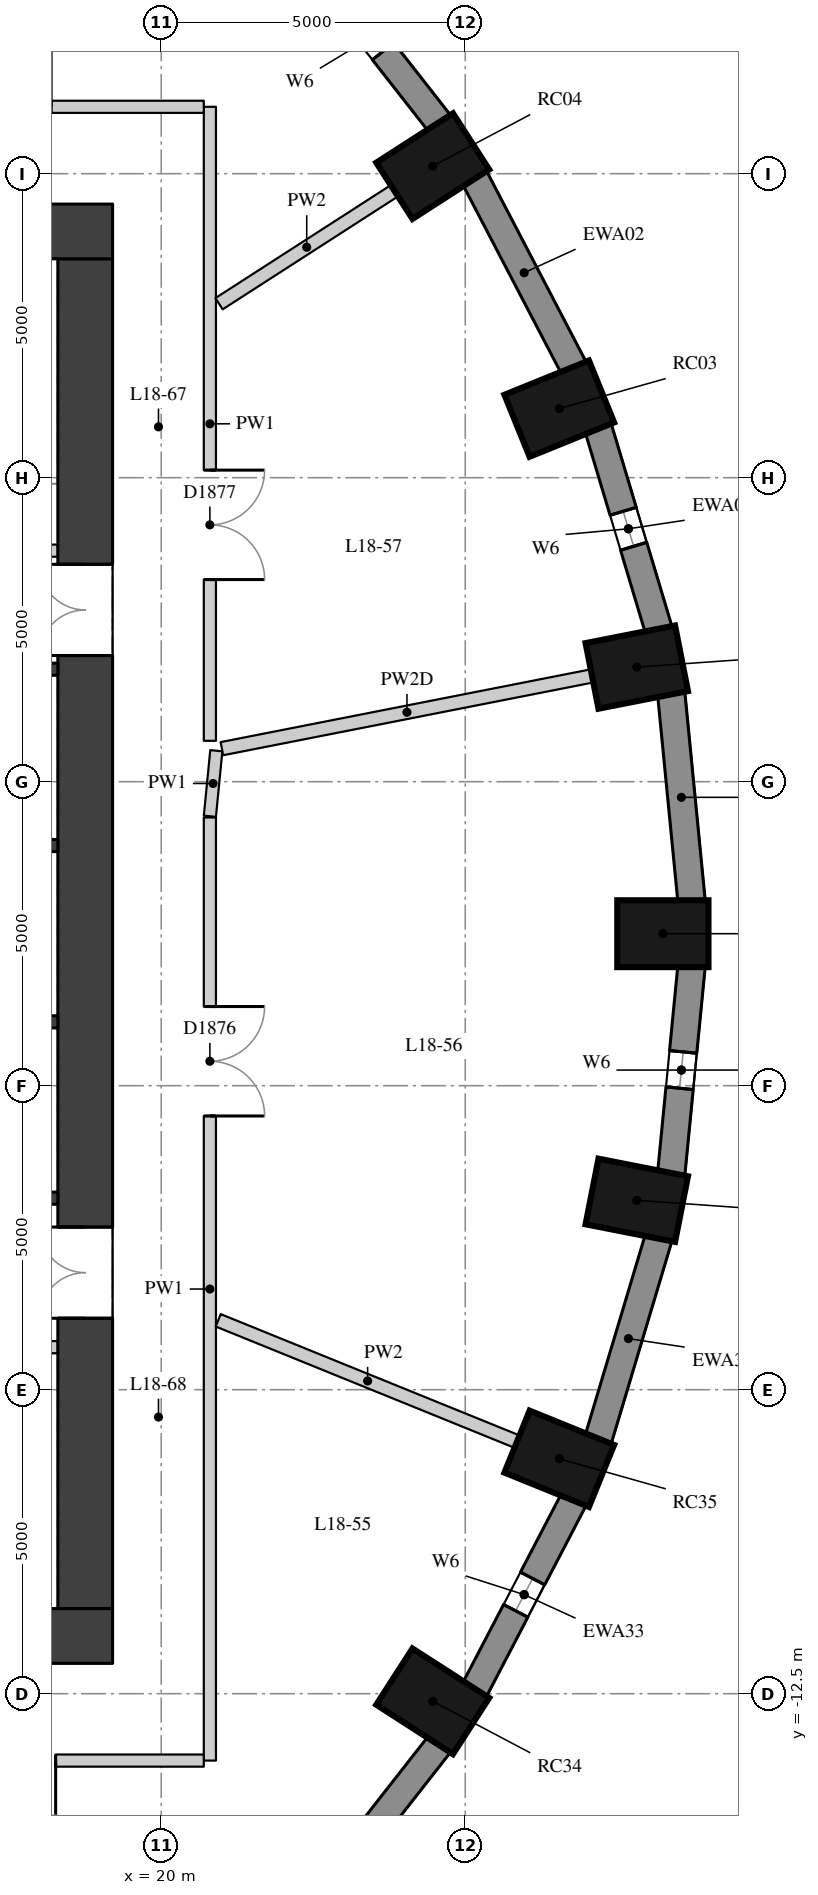
"""IFC4 building model, lengths in metres.
Left out: names, types, materials, properties, quantities, classifications, styles, units other than length and angle.
Written with IfcOpenShell. Run it as: python <this file> out.ifc"""

import sys

from ifc_helpers import new_model, si_unit, direction, frame, frame_2d, origin, origin_2d, place, context, subcontext, project, spatial, rectangle, extrude, element, fill, save


model = new_model("IFC4")
c1 = context("Model", 3, precision=1e-05, world=origin(), true_north=direction((0.0, 1.0)))
c2 = subcontext(c1, "Body", "Model", "MODEL_VIEW")
j1 = project(units=[si_unit("LENGTHUNIT", "METRE"), si_unit("PLANEANGLEUNIT", "RADIAN")], contexts=[c1])
p1 = place(None, origin())
s1 = spatial("IfcSite", under=j1, at=p1, CompositionType="ELEMENT")
p2 = place(p1, origin())
s2 = spatial("IfcBuilding", under=s1, at=p2, CompositionType="ELEMENT")
p3 = place(p2, frame((0.0, 0.0, 67.9)))
s3 = spatial("IfcBuildingStorey", under=s2, at=p3, CompositionType="ELEMENT", Elevation=67.9)
for number, where, z_axis, x_axis in (
    (1, (28.25, 0.0, 0.0), (0.0, 0.0, 1.0), (1.0, 0.0, 0.0)),
    (2, (27.821, 4.385, 0.0), (0.0, 0.0, 1.0), (0.981, 0.193, 0.0)),
    (3, (26.546, 8.636, 0.0), (0.0, 0.0, 1.0), (0.927, 0.376, 0.0)),
    (4, (24.465, 12.625, 0.0), (0.0, 0.0, 1.0), (0.841, 0.541, 0.0)),
    (5, (24.465, -12.625, 0.0), (0.0, 0.0, 1.0), (0.841, -0.541, 0.0)),
    (6, (26.546, -8.636, 0.0), (0.0, 0.0, 1.0), (0.927, -0.376, 0.0)),
    (7, (27.821, -4.385, 0.0), (0.0, 0.0, 1.0), (0.981, -0.193, 0.0)),
):
    element("IfcColumn", number, at=place(p3, frame(where, z_axis=z_axis, x_axis=x_axis)), inside=s3, PredefinedType="COLUMN", context=c2, shape_type="SweptSolid", body=[
        extrude(rectangle(XDim=1.5, YDim=1.1, at=origin_2d()), origin(), (0.0, 0.0, 1.0), 3.3),
    ])
p4 = place(p3, frame((28.722, 0.53, 0.0), z_axis=(0.0, 0.0, 1.0), x_axis=(-0.097389581596, 0.995246336038, 0.0)))
e8 = element("IfcWall", 8, at=p4, inside=s3, PredefinedType="SOLIDWALL", context=c2, shape_type="SweptSolid", body=[
    extrude(rectangle(XDim=3.442, YDim=0.45, at=frame_2d((1.721, 0.0))), origin(), (0.0, 0.0, 1.0), 3.02),
])
p5 = place(p3, frame((28.182, 4.996, 0.0), z_axis=(0.0, 0.0, 1.0), x_axis=(-0.287064133733, 0.957911364963, 0.0)))
e9 = element("IfcWall", 9, at=p5, inside=s3, PredefinedType="SOLIDWALL", context=c2, shape_type="SweptSolid", body=[
    extrude(rectangle(XDim=3.473, YDim=0.45, at=frame_2d((1.737, 0.0))), origin(), (0.0, 0.0, 1.0), 3.02),
])
p6 = place(p5, frame((1.437, 0.0, 0.4)))
e10 = element("IfcOpeningElement", 10, at=p6, cuts=e9, PredefinedType="OPENING", context=c2, shape_type="SweptSolid", body=[
    extrude(rectangle(XDim=0.6, YDim=1.75, at=frame_2d((0.3, 0.875))), frame((0.0, 0.235, 0.0), z_axis=(0.0, -1.0, 0.0), x_axis=(1.0, 0.0, 0.0)), (0.0, 0.0, 1.0), 0.47),
])
p7 = place(p3, frame((26.786, 9.305, 0.0), z_axis=(0.0, 0.0, 1.0), x_axis=(-0.462492775226, 0.886623050041, 0.0)))
e11 = element("IfcWall", 11, at=p7, inside=s3, PredefinedType="SOLIDWALL", context=c2, shape_type="SweptSolid", body=[
    extrude(rectangle(XDim=3.532, YDim=0.45, at=frame_2d((1.766, 0.0))), origin(), (0.0, 0.0, 1.0), 3.02),
])
p8 = place(p3, frame((24.578, 13.328, 0.0), z_axis=(0.0, 0.0, 1.0), x_axis=(-0.616661975264, 0.787228053529, 0.0)))
e12 = element("IfcWall", 12, at=p8, inside=s3, PredefinedType="SOLIDWALL", context=c2, shape_type="SweptSolid", body=[
    extrude(rectangle(XDim=3.61, YDim=0.45, at=frame_2d((1.805, 0.0))), origin(), (0.0, 0.0, 1.0), 3.02),
])
p9 = place(p8, frame((1.505, 0.0, 0.4)))
e13 = element("IfcOpeningElement", 13, at=p9, cuts=e12, PredefinedType="OPENING", context=c2, shape_type="SweptSolid", body=[
    extrude(rectangle(XDim=0.6, YDim=1.75, at=frame_2d((0.3, 0.875))), frame((0.0, 0.235, 0.0), z_axis=(0.0, -1.0, 0.0), x_axis=(1.0, 0.0, 0.0)), (0.0, 0.0, 1.0), 0.47),
])
p10 = place(p3, frame((22.352, -16.17, 0.0), z_axis=(0.0, 0.0, 1.0), x_axis=(0.616661975264, 0.787228053529, 0.0)))
e14 = element("IfcWall", 14, at=p10, inside=s3, PredefinedType="SOLIDWALL", context=c2, shape_type="SweptSolid", body=[
    extrude(rectangle(XDim=3.61, YDim=0.45, at=frame_2d((1.805, 0.0))), origin(), (0.0, 0.0, 1.0), 3.02),
])
p11 = place(p3, frame((25.152, -12.437, 0.0), z_axis=(0.0, 0.0, 1.0), x_axis=(0.462492775226, 0.886623050041, 0.0)))
e15 = element("IfcWall", 15, at=p11, inside=s3, PredefinedType="SOLIDWALL", context=c2, shape_type="SweptSolid", body=[
    extrude(rectangle(XDim=3.532, YDim=0.45, at=frame_2d((1.766, 0.0))), origin(), (0.0, 0.0, 1.0), 3.02),
])
p12 = place(p11, frame((1.466, 0.0, 0.4)))
e16 = element("IfcOpeningElement", 16, at=p12, cuts=e15, PredefinedType="OPENING", context=c2, shape_type="SweptSolid", body=[
    extrude(rectangle(XDim=0.6, YDim=1.75, at=frame_2d((0.3, 0.875))), frame((0.0, 0.235, 0.0), z_axis=(0.0, -1.0, 0.0), x_axis=(1.0, 0.0, 0.0)), (0.0, 0.0, 1.0), 0.47),
])
p13 = place(p3, frame((27.185, -8.323, 0.0), z_axis=(0.0, 0.0, 1.0), x_axis=(0.287064133733, 0.957911364963, 0.0)))
e17 = element("IfcWall", 17, at=p13, inside=s3, PredefinedType="SOLIDWALL", context=c2, shape_type="SweptSolid", body=[
    extrude(rectangle(XDim=3.473, YDim=0.45, at=frame_2d((1.737, 0.0))), origin(), (0.0, 0.0, 1.0), 3.02),
])
p14 = place(p3, frame((28.387, -3.956, 0.0), z_axis=(0.0, 0.0, 1.0), x_axis=(0.097389581596, 0.995246336038, 0.0)))
e18 = element("IfcWall", 18, at=p14, inside=s3, PredefinedType="SOLIDWALL", context=c2, shape_type="SweptSolid", body=[
    extrude(rectangle(XDim=3.442, YDim=0.45, at=frame_2d((1.721, 0.0))), origin(), (0.0, 0.0, 1.0), 3.02),
])
p15 = place(p14, frame((1.421, 0.0, 0.4)))
e19 = element("IfcOpeningElement", 19, at=p15, cuts=e18, PredefinedType="OPENING", context=c2, shape_type="SweptSolid", body=[
    extrude(rectangle(XDim=0.6, YDim=1.75, at=frame_2d((0.3, 0.875))), frame((0.0, 0.235, 0.0), z_axis=(0.0, -1.0, 0.0), x_axis=(1.0, 0.0, 0.0)), (0.0, 0.0, 1.0), 0.47),
])
p16 = place(p3, frame((18.75, -11.1, 0.0), z_axis=(0.0, 0.0, 1.0), x_axis=(0.0, 1.0, 0.0)))
e20 = element("IfcWall", 20, at=p16, inside=s3, PredefinedType="SHEAR", context=c2, shape_type="SweptSolid", body=[
    extrude(rectangle(XDim=22.2, YDim=0.9, at=frame_2d((11.1, 0.0))), origin(), (0.0, 0.0, 1.0), 3.02),
])
p17 = place(p16, frame((15.675, 0.0, 0.0)))
e21 = element("IfcOpeningElement", 21, at=p17, cuts=e20, PredefinedType="OPENING", context=c2, shape_type="SweptSolid", body=[
    extrude(rectangle(XDim=1.5, YDim=2.1, at=frame_2d((0.75, 1.05))), frame((0.0, 0.46, 0.0), z_axis=(0.0, -1.0, 0.0), x_axis=(1.0, 0.0, 0.0)), (0.0, 0.0, 1.0), 0.92),
])
p18 = place(p16, frame((4.775, 0.0, 0.0)))
e22 = element("IfcOpeningElement", 22, at=p18, cuts=e20, PredefinedType="OPENING", context=c2, shape_type="SweptSolid", body=[
    extrude(rectangle(XDim=1.5, YDim=2.1, at=frame_2d((0.75, 1.05))), frame((0.0, 0.46, 0.0), z_axis=(0.0, -1.0, 0.0), x_axis=(1.0, 0.0, 0.0)), (0.0, 0.0, 1.0), 0.92),
])
for number, where, z_axis, x_axis in (
    (23, (4.0, 11.55, 0.0), (0.0, 0.0, 1.0), (1.0, 0.0, 0.0)),
    (24, (4.0, -11.55, 0.0), (0.0, 0.0, 1.0), (1.0, 0.0, 0.0)),
):
    element("IfcWall", number, at=place(p3, frame(where, z_axis=z_axis, x_axis=x_axis)), inside=s3, PredefinedType="SHEAR", context=c2, shape_type="SweptSolid", body=[
        extrude(rectangle(XDim=15.2, YDim=0.9, at=frame_2d((7.6, 0.0))), origin(), (0.0, 0.0, 1.0), 3.02),
    ])
for number, where, z_axis, x_axis in (
    (25, (16.0, -4.35, 0.0), (0.0, 0.0, 1.0), (1.0, 0.0, 0.0)),
    (26, (16.0, -1.45, 0.0), (0.0, 0.0, 1.0), (1.0, 0.0, 0.0)),
    (27, (16.0, 1.45, 0.0), (0.0, 0.0, 1.0), (1.0, 0.0, 0.0)),
    (28, (16.0, 4.35, 0.0), (0.0, 0.0, 1.0), (1.0, 0.0, 0.0)),
):
    element("IfcWall", number, at=place(p3, frame(where, z_axis=z_axis, x_axis=x_axis)), inside=s3, PredefinedType="SHEAR", context=c2, shape_type="SweptSolid", body=[
        extrude(rectangle(XDim=2.3, YDim=0.2, at=frame_2d((1.15, 0.0))), origin(), (0.0, 0.0, 1.0), 3.02),
    ])
p19 = place(p3, frame((16.0, 6.3, 0.0), z_axis=(0.0, 0.0, 1.0), x_axis=(1.0, 0.0, 0.0)))
e29 = element("IfcWall", 29, at=p19, inside=s3, PredefinedType="PARTITIONING", context=c2, shape_type="SweptSolid", body=[
    extrude(rectangle(XDim=2.3, YDim=0.2, at=frame_2d((1.15, 0.0))), origin(), (0.0, 0.0, 1.0), 3.02),
])
p20 = place(p19, frame((0.3, 0.0, 0.0)))
e30 = element("IfcOpeningElement", 30, at=p20, cuts=e29, PredefinedType="OPENING", context=c2, shape_type="SweptSolid", body=[
    extrude(rectangle(XDim=0.9, YDim=2.1, at=frame_2d((0.45, 1.05))), frame((0.0, 0.11, 0.0), z_axis=(0.0, -1.0, 0.0), x_axis=(1.0, 0.0, 0.0)), (0.0, 0.0, 1.0), 0.22),
])
p21 = place(p3, frame((16.0, -6.8, 0.0), z_axis=(0.0, 0.0, 1.0), x_axis=(1.0, 0.0, 0.0)))
e31 = element("IfcWall", 31, at=p21, inside=s3, PredefinedType="PARTITIONING", context=c2, shape_type="SweptSolid", body=[
    extrude(rectangle(XDim=2.3, YDim=0.2, at=frame_2d((1.15, 0.0))), origin(), (0.0, 0.0, 1.0), 3.02),
])
p22 = place(p21, frame((0.2, 0.0, 0.0)))
e32 = element("IfcOpeningElement", 32, at=p22, cuts=e31, PredefinedType="OPENING", context=c2, shape_type="SweptSolid", body=[
    extrude(rectangle(XDim=0.9, YDim=2.1, at=frame_2d((0.45, 1.05))), frame((0.0, 0.11, 0.0), z_axis=(0.0, -1.0, 0.0), x_axis=(1.0, 0.0, 0.0)), (0.0, 0.0, 1.0), 0.22),
])
p23 = place(p3, frame((20.8, 13.6, 0.0), z_axis=(0.0, 0.0, 1.0), x_axis=(0.0, -1.0, 0.0)))
e33 = element("IfcWall", 33, at=p23, inside=s3, PredefinedType="PARTITIONING", context=c2, shape_type="SweptSolid", body=[
    extrude(rectangle(XDim=10.428, YDim=0.2, at=frame_2d((5.214, 0.0))), origin(), (0.0, 0.0, 1.0), 3.02),
])
p24 = place(p23, frame((5.976, 0.0, 0.0)))
e34 = element("IfcOpeningElement", 34, at=p24, cuts=e33, PredefinedType="OPENING", context=c2, shape_type="SweptSolid", body=[
    extrude(rectangle(XDim=1.8, YDim=2.1, at=frame_2d((0.9, 1.05))), frame((0.0, 0.11, 0.0), z_axis=(0.0, -1.0, 0.0), x_axis=(1.0, 0.0, 0.0)), (0.0, 0.0, 1.0), 0.22),
])
p25 = place(p3, frame((20.906, 3.01, 0.0), z_axis=(0.0, 0.0, 1.0), x_axis=(-0.09782971129, -0.995203169001, 0.0)))
e35 = element("IfcWall", 35, at=p25, inside=s3, PredefinedType="PARTITIONING", context=c2, shape_type="SweptSolid", body=[
    extrude(rectangle(XDim=1.083, YDim=0.2, at=frame_2d((0.542, 0.0))), origin(), (0.0, 0.0, 1.0), 3.02),
])
p26 = place(p3, frame((20.8, 1.912, 0.0), z_axis=(0.0, 0.0, 1.0), x_axis=(0.0, -1.0, 0.0)))
e36 = element("IfcWall", 36, at=p26, inside=s3, PredefinedType="PARTITIONING", context=c2, shape_type="SweptSolid", body=[
    extrude(rectangle(XDim=15.512, YDim=0.2, at=frame_2d((7.756, 0.0))), origin(), (0.0, 0.0, 1.0), 3.02),
])
p27 = place(p26, frame((3.11, 0.0, 0.0)))
e37 = element("IfcOpeningElement", 37, at=p27, cuts=e36, PredefinedType="OPENING", context=c2, shape_type="SweptSolid", body=[
    extrude(rectangle(XDim=1.8, YDim=2.1, at=frame_2d((0.9, 1.05))), frame((0.0, 0.11, 0.0), z_axis=(0.0, -1.0, 0.0), x_axis=(1.0, 0.0, 0.0)), (0.0, 0.0, 1.0), 0.22),
])
p28 = place(p3, frame((20.7, -13.6, 0.0), z_axis=(0.0, 0.0, 1.0), x_axis=(-1.0, 0.0, 0.0)))
e38 = element("IfcWall", 38, at=p28, inside=s3, PredefinedType="PARTITIONING", context=c2, shape_type="SweptSolid", body=[
    extrude(rectangle(XDim=9.331, YDim=0.2, at=frame_2d((4.666, 0.0))), origin(), (0.0, 0.0, 1.0), 3.02),
])
p29 = place(p28, frame((2.436, 0.0, 0.0)))
e39 = element("IfcOpeningElement", 39, at=p29, cuts=e38, PredefinedType="OPENING", context=c2, shape_type="SweptSolid", body=[
    extrude(rectangle(XDim=1.8, YDim=2.1, at=frame_2d((0.9, 1.05))), frame((0.0, 0.11, 0.0), z_axis=(0.0, -1.0, 0.0), x_axis=(1.0, 0.0, 0.0)), (0.0, 0.0, 1.0), 0.22),
])
p30 = place(p3, frame((14.086, 13.6, 0.0), z_axis=(0.0, 0.0, 1.0), x_axis=(1.0, 0.0, 0.0)))
e40 = element("IfcWall", 40, at=p30, inside=s3, PredefinedType="PARTITIONING", context=c2, shape_type="SweptSolid", body=[
    extrude(rectangle(XDim=6.614, YDim=0.2, at=frame_2d((3.307, 0.0))), origin(), (0.0, 0.0, 1.0), 3.02),
])
p31 = place(p30, frame((2.303, 0.0, 0.0)))
e41 = element("IfcOpeningElement", 41, at=p31, cuts=e40, PredefinedType="OPENING", context=c2, shape_type="SweptSolid", body=[
    extrude(rectangle(XDim=1.8, YDim=2.1, at=frame_2d((0.9, 1.05))), frame((0.0, 0.11, 0.0), z_axis=(0.0, -1.0, 0.0), x_axis=(1.0, 0.0, 0.0)), (0.0, 0.0, 1.0), 0.22),
])
p32 = place(p3, frame((27.085, 4.24, 0.0), z_axis=(0.0, 0.0, 1.0), x_axis=(-0.981208260902, -0.192951674616, 0.0)))
e42 = element("IfcWall", 42, at=p32, inside=s3, PredefinedType="PARTITIONING", context=c2, shape_type="SweptSolid", body=[
    extrude(rectangle(XDim=6.204, YDim=0.22, at=frame_2d((3.102, 0.0))), origin(), (0.0, 0.0, 1.0), 2.47),
])
p33 = place(p3, frame((23.835, 12.219, 0.0), z_axis=(0.0, 0.0, 1.0), x_axis=(-0.840694872373, -0.541509124176, 0.0)))
e43 = element("IfcWall", 43, at=p33, inside=s3, PredefinedType="PARTITIONING", context=c2, shape_type="SweptSolid", body=[
    extrude(rectangle(XDim=3.43, YDim=0.22, at=frame_2d((1.715, 0.0))), origin(), (0.0, 0.0, 1.0), 3.02),
])
p34 = place(p3, frame((25.851, -8.354, 0.0), z_axis=(0.0, 0.0, 1.0), x_axis=(-0.926546814299, 0.376179479653, 0.0)))
e44 = element("IfcWall", 44, at=p34, inside=s3, PredefinedType="PARTITIONING", context=c2, shape_type="SweptSolid", body=[
    extrude(rectangle(XDim=5.304, YDim=0.22, at=frame_2d((2.652, 0.0))), origin(), (0.0, 0.0, 1.0), 3.02),
])
p35 = place(p6, origin())
e45 = element("IfcWindow", 45, at=p35, inside=s3, PartitioningType="SINGLE_PANEL", PredefinedType="WINDOW", context=c2, shape_type="SweptSolid", body=[
    extrude(rectangle(XDim=0.6, YDim=1.75, at=frame_2d((0.3, 0.875))), frame((0.0, 0.035, 0.0), z_axis=(0.0, -1.0, 0.0), x_axis=(1.0, 0.0, 0.0)), (0.0, 0.0, 1.0), 0.06),
])
fill(e10, e45)
p36 = place(p9, origin())
e46 = element("IfcWindow", 46, at=p36, inside=s3, PartitioningType="SINGLE_PANEL", PredefinedType="WINDOW", context=c2, shape_type="SweptSolid", body=[
    extrude(rectangle(XDim=0.6, YDim=1.75, at=frame_2d((0.3, 0.875))), frame((0.0, 0.035, 0.0), z_axis=(0.0, -1.0, 0.0), x_axis=(1.0, 0.0, 0.0)), (0.0, 0.0, 1.0), 0.06),
])
fill(e13, e46)
p37 = place(p12, origin())
e47 = element("IfcWindow", 47, at=p37, inside=s3, PartitioningType="SINGLE_PANEL", PredefinedType="WINDOW", context=c2, shape_type="SweptSolid", body=[
    extrude(rectangle(XDim=0.6, YDim=1.75, at=frame_2d((0.3, 0.875))), frame((0.0, 0.035, 0.0), z_axis=(0.0, -1.0, 0.0), x_axis=(1.0, 0.0, 0.0)), (0.0, 0.0, 1.0), 0.06),
])
fill(e16, e47)
p38 = place(p15, origin())
e48 = element("IfcWindow", 48, at=p38, inside=s3, PartitioningType="SINGLE_PANEL", PredefinedType="WINDOW", context=c2, shape_type="SweptSolid", body=[
    extrude(rectangle(XDim=0.6, YDim=1.75, at=frame_2d((0.3, 0.875))), frame((0.0, 0.035, 0.0), z_axis=(0.0, -1.0, 0.0), x_axis=(1.0, 0.0, 0.0)), (0.0, 0.0, 1.0), 0.06),
])
fill(e19, e48)
p39 = place(p17, origin())
e49 = element("IfcDoor", 49, at=p39, inside=s3, OperationType="DOUBLE_DOOR_SINGLE_SWING", PredefinedType="DOOR", context=c2, shape_type="SweptSolid", body=[
    extrude(rectangle(XDim=1.5, YDim=2.1, at=frame_2d((0.75, 1.05))), frame((0.0, 0.025, 0.0), z_axis=(0.0, -1.0, 0.0), x_axis=(1.0, 0.0, 0.0)), (0.0, 0.0, 1.0), 0.05),
])
fill(e21, e49)
p40 = place(p18, origin())
e50 = element("IfcDoor", 50, at=p40, inside=s3, OperationType="DOUBLE_DOOR_SINGLE_SWING", PredefinedType="DOOR", context=c2, shape_type="SweptSolid", body=[
    extrude(rectangle(XDim=1.5, YDim=2.1, at=frame_2d((0.75, 1.05))), frame((0.0, 0.025, 0.0), z_axis=(0.0, -1.0, 0.0), x_axis=(1.0, 0.0, 0.0)), (0.0, 0.0, 1.0), 0.05),
])
fill(e22, e50)
p41 = place(p29, origin())
e51 = element("IfcDoor", 51, at=p41, inside=s3, OperationType="DOUBLE_DOOR_SINGLE_SWING", PredefinedType="DOOR", context=c2, shape_type="SweptSolid", body=[
    extrude(rectangle(XDim=1.8, YDim=2.1, at=frame_2d((0.9, 1.05))), frame((0.0, 0.025, 0.0), z_axis=(0.0, -1.0, 0.0), x_axis=(1.0, 0.0, 0.0)), (0.0, 0.0, 1.0), 0.05),
])
fill(e39, e51)
p42 = place(p27, origin())
e52 = element("IfcDoor", 52, at=p42, inside=s3, OperationType="DOUBLE_DOOR_SINGLE_SWING", PredefinedType="DOOR", context=c2, shape_type="SweptSolid", body=[
    extrude(rectangle(XDim=1.8, YDim=2.1, at=frame_2d((0.9, 1.05))), frame((0.0, 0.025, 0.0), z_axis=(0.0, -1.0, 0.0), x_axis=(1.0, 0.0, 0.0)), (0.0, 0.0, 1.0), 0.05),
])
fill(e37, e52)
p43 = place(p24, origin())
e53 = element("IfcDoor", 53, at=p43, inside=s3, OperationType="DOUBLE_DOOR_SINGLE_SWING", PredefinedType="DOOR", context=c2, shape_type="SweptSolid", body=[
    extrude(rectangle(XDim=1.8, YDim=2.1, at=frame_2d((0.9, 1.05))), frame((0.0, 0.025, 0.0), z_axis=(0.0, -1.0, 0.0), x_axis=(1.0, 0.0, 0.0)), (0.0, 0.0, 1.0), 0.05),
])
fill(e34, e53)
save(model, sys.argv[1])
